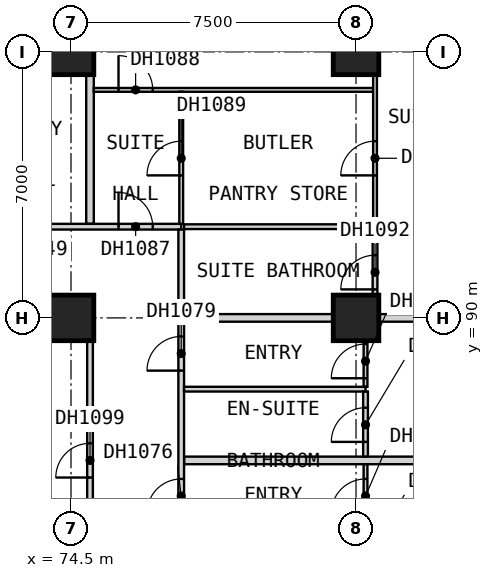
"""IFC4 building model, lengths in metres.
Left out: names, types, materials, properties, quantities, classifications, styles, units other than length and angle.
Written with IfcOpenShell. Run it as: python <this file> out.ifc"""

import sys

from ifc_helpers import new_model, si_unit, direction, frame, frame_2d, origin, origin_2d, place, context, subcontext, project, spatial, rectangle, extrude, element, fill, save


model = new_model("IFC4")
c1 = context("Model", 3, precision=1e-05, world=origin(), true_north=direction((0.0, 1.0)))
c2 = subcontext(c1, "Body", "Model", "MODEL_VIEW")
j1 = project(units=[si_unit("LENGTHUNIT", "METRE"), si_unit("PLANEANGLEUNIT", "RADIAN")], contexts=[c1])
p1 = place(None, origin())
s1 = spatial("IfcSite", under=j1, at=p1, CompositionType="ELEMENT")
p2 = place(p1, origin())
s2 = spatial("IfcBuilding", under=s1, at=p2, CompositionType="ELEMENT")
p3 = place(p2, frame((0.0, 0.0, 48.4)))
s3 = spatial("IfcBuildingStorey", under=s2, at=p3, CompositionType="ELEMENT", Elevation=48.4)
for number, where, z_axis, x_axis in (
    (1, (74.5, 90.0, 0.0), (0.0, 0.0, 1.0), (1.0, 0.0, 0.0)),
    (2, (74.5, 97.0, 0.0), (0.0, 0.0, 1.0), (1.0, 0.0, 0.0)),
    (3, (82.0, 90.0, 0.0), (0.0, 0.0, 1.0), (1.0, 0.0, 0.0)),
    (4, (82.0, 97.0, 0.0), (0.0, 0.0, 1.0), (1.0, 0.0, 0.0)),
):
    element("IfcColumn", number, at=place(p3, frame(where, z_axis=z_axis, x_axis=x_axis)), inside=s3, PredefinedType="COLUMN", context=c2, shape_type="SweptSolid", body=[
        extrude(rectangle(XDim=1.2, YDim=1.2, at=origin_2d()), origin(), (0.0, 0.0, 1.0), 3.6),
    ])
p4 = place(p3, frame((77.475, 86.25, 0.0), z_axis=(0.0, 0.0, 1.0), x_axis=(1.0, 0.0, 0.0)))
e5 = element("IfcWall", 5, at=p4, inside=s3, PredefinedType="PARTITIONING", context=c2, shape_type="SweptSolid", body=[
    extrude(rectangle(XDim=11.715, YDim=0.2, at=frame_2d((5.857, 0.0))), origin(), (0.0, 0.0, 1.0), 3.35),
])
p5 = place(p3, frame((77.475, 90.0, 0.0), z_axis=(0.0, 0.0, 1.0), x_axis=(1.0, 0.0, 0.0)))
e6 = element("IfcWall", 6, at=p5, inside=s3, PredefinedType="PARTITIONING", context=c2, shape_type="SweptSolid", body=[
    extrude(rectangle(XDim=12.525, YDim=0.2, at=frame_2d((6.262, 0.0))), origin(), (0.0, 0.0, 1.0), 3.35),
])
p6 = place(p3, frame((75.0, 92.475, 0.0), z_axis=(0.0, 0.0, 1.0), x_axis=(0.0, 1.0, 0.0)))
e7 = element("IfcWall", 7, at=p6, inside=s3, PredefinedType="PARTITIONING", context=c2, shape_type="SweptSolid", body=[
    extrude(rectangle(XDim=11.715, YDim=0.2, at=frame_2d((5.857, 0.0))), origin(), (0.0, 0.0, 1.0), 3.35),
])
p7 = place(p3, frame((33.75, 90.0, 0.0), z_axis=(0.0, 0.0, 1.0), x_axis=(1.0, 0.0, 0.0)))
e8 = element("IfcWall", 8, at=p7, inside=s3, PredefinedType="PARTITIONING", context=c2, shape_type="SweptSolid", body=[
    extrude(rectangle(XDim=41.25, YDim=0.15, at=frame_2d((20.625, 0.0))), origin(), (0.0, 0.0, 1.0), 3.35),
])
p8 = place(p7, frame((1.425, 0.0, 0.0)))
e9 = element("IfcOpeningElement", 9, at=p8, cuts=e8, PredefinedType="OPENING", context=c2, shape_type="SweptSolid", body=[
    extrude(rectangle(XDim=0.9, YDim=2.1, at=frame_2d((0.45, 1.05))), frame((0.0, 0.085, 0.0), z_axis=(0.0, -1.0, 0.0), x_axis=(1.0, 0.0, 0.0)), (0.0, 0.0, 1.0), 0.17),
])
p9 = place(p7, frame((12.45, 0.0, 0.0)))
e10 = element("IfcOpeningElement", 10, at=p9, cuts=e8, PredefinedType="OPENING", context=c2, shape_type="SweptSolid", body=[
    extrude(rectangle(XDim=0.9, YDim=2.1, at=frame_2d((0.45, 1.05))), frame((0.0, 0.085, 0.0), z_axis=(0.0, -1.0, 0.0), x_axis=(1.0, 0.0, 0.0)), (0.0, 0.0, 1.0), 0.17),
])
p10 = place(p3, frame((33.75, 92.4, 0.0), z_axis=(0.0, 0.0, 1.0), x_axis=(1.0, 0.0, 0.0)))
e11 = element("IfcWall", 11, at=p10, inside=s3, PredefinedType="PARTITIONING", context=c2, shape_type="SweptSolid", body=[
    extrude(rectangle(XDim=43.65, YDim=0.15, at=frame_2d((21.825, 0.0))), origin(), (0.0, 0.0, 1.0), 3.35),
])
p11 = place(p10, frame((5.175, 0.0, 0.0)))
e12 = element("IfcOpeningElement", 12, at=p11, cuts=e11, PredefinedType="OPENING", context=c2, shape_type="SweptSolid", body=[
    extrude(rectangle(XDim=0.9, YDim=2.1, at=frame_2d((0.45, 1.05))), frame((0.0, 0.085, 0.0), z_axis=(0.0, -1.0, 0.0), x_axis=(1.0, 0.0, 0.0)), (0.0, 0.0, 1.0), 0.17),
])
p12 = place(p10, frame((9.863, 0.0, 0.0)))
e13 = element("IfcOpeningElement", 13, at=p12, cuts=e11, PredefinedType="OPENING", context=c2, shape_type="SweptSolid", body=[
    extrude(rectangle(XDim=0.9, YDim=2.1, at=frame_2d((0.45, 1.05))), frame((0.0, 0.085, 0.0), z_axis=(0.0, -1.0, 0.0), x_axis=(1.0, 0.0, 0.0)), (0.0, 0.0, 1.0), 0.17),
])
p13 = place(p10, frame((13.613, 0.0, 0.0)))
e14 = element("IfcOpeningElement", 14, at=p13, cuts=e11, PredefinedType="OPENING", context=c2, shape_type="SweptSolid", body=[
    extrude(rectangle(XDim=0.9, YDim=2.1, at=frame_2d((0.45, 1.05))), frame((0.0, 0.085, 0.0), z_axis=(0.0, -1.0, 0.0), x_axis=(1.0, 0.0, 0.0)), (0.0, 0.0, 1.0), 0.17),
])
p14 = place(p10, frame((17.363, 0.0, 0.0)))
e15 = element("IfcOpeningElement", 15, at=p14, cuts=e11, PredefinedType="OPENING", context=c2, shape_type="SweptSolid", body=[
    extrude(rectangle(XDim=0.9, YDim=2.1, at=frame_2d((0.45, 1.05))), frame((0.0, 0.085, 0.0), z_axis=(0.0, -1.0, 0.0), x_axis=(1.0, 0.0, 0.0)), (0.0, 0.0, 1.0), 0.17),
])
p15 = place(p10, frame((21.113, 0.0, 0.0)))
e16 = element("IfcOpeningElement", 16, at=p15, cuts=e11, PredefinedType="OPENING", context=c2, shape_type="SweptSolid", body=[
    extrude(rectangle(XDim=0.9, YDim=2.1, at=frame_2d((0.45, 1.05))), frame((0.0, 0.085, 0.0), z_axis=(0.0, -1.0, 0.0), x_axis=(1.0, 0.0, 0.0)), (0.0, 0.0, 1.0), 0.17),
])
p16 = place(p10, frame((28.05, 0.0, 0.0)))
e17 = element("IfcOpeningElement", 17, at=p16, cuts=e11, PredefinedType="OPENING", context=c2, shape_type="SweptSolid", body=[
    extrude(rectangle(XDim=0.9, YDim=2.1, at=frame_2d((0.45, 1.05))), frame((0.0, 0.085, 0.0), z_axis=(0.0, -1.0, 0.0), x_axis=(1.0, 0.0, 0.0)), (0.0, 0.0, 1.0), 0.17),
])
p17 = place(p10, frame((32.363, 0.0, 0.0)))
e18 = element("IfcOpeningElement", 18, at=p17, cuts=e11, PredefinedType="OPENING", context=c2, shape_type="SweptSolid", body=[
    extrude(rectangle(XDim=0.9, YDim=2.1, at=frame_2d((0.45, 1.05))), frame((0.0, 0.085, 0.0), z_axis=(0.0, -1.0, 0.0), x_axis=(1.0, 0.0, 0.0)), (0.0, 0.0, 1.0), 0.17),
])
p18 = place(p10, frame((39.3, 0.0, 0.0)))
e19 = element("IfcOpeningElement", 19, at=p18, cuts=e11, PredefinedType="OPENING", context=c2, shape_type="SweptSolid", body=[
    extrude(rectangle(XDim=0.9, YDim=2.1, at=frame_2d((0.45, 1.05))), frame((0.0, 0.085, 0.0), z_axis=(0.0, -1.0, 0.0), x_axis=(1.0, 0.0, 0.0)), (0.0, 0.0, 1.0), 0.17),
])
p19 = place(p10, frame((42.0, 0.0, 0.0)))
e20 = element("IfcOpeningElement", 20, at=p19, cuts=e11, PredefinedType="OPENING", context=c2, shape_type="SweptSolid", body=[
    extrude(rectangle(XDim=0.9, YDim=2.1, at=frame_2d((0.45, 1.05))), frame((0.0, 0.085, 0.0), z_axis=(0.0, -1.0, 0.0), x_axis=(1.0, 0.0, 0.0)), (0.0, 0.0, 1.0), 0.17),
])
p20 = place(p3, frame((75.0, 78.075, 0.0), z_axis=(0.0, 0.0, 1.0), x_axis=(0.0, 1.0, 0.0)))
e21 = element("IfcWall", 21, at=p20, inside=s3, PredefinedType="PARTITIONING", context=c2, shape_type="SweptSolid", body=[
    extrude(rectangle(XDim=11.85, YDim=0.15, at=frame_2d((5.925, 0.0))), origin(), (0.0, 0.0, 1.0), 3.35),
])
p21 = place(p20, frame((7.725, 0.0, 0.0)))
e22 = element("IfcOpeningElement", 22, at=p21, cuts=e21, PredefinedType="OPENING", context=c2, shape_type="SweptSolid", body=[
    extrude(rectangle(XDim=0.9, YDim=2.1, at=frame_2d((0.45, 1.05))), frame((0.0, 0.085, 0.0), z_axis=(0.0, -1.0, 0.0), x_axis=(1.0, 0.0, 0.0)), (0.0, 0.0, 1.0), 0.17),
])
p22 = place(p20, frame((1.725, 0.0, 0.0)))
e23 = element("IfcOpeningElement", 23, at=p22, cuts=e21, PredefinedType="OPENING", context=c2, shape_type="SweptSolid", body=[
    extrude(rectangle(XDim=0.9, YDim=2.1, at=frame_2d((0.45, 1.05))), frame((0.0, 0.085, 0.0), z_axis=(0.0, -1.0, 0.0), x_axis=(1.0, 0.0, 0.0)), (0.0, 0.0, 1.0), 0.17),
])
p23 = place(p3, frame((77.4, 50.175, 0.0), z_axis=(0.0, 0.0, 1.0), x_axis=(0.0, 1.0, 0.0)))
e24 = element("IfcWall", 24, at=p23, inside=s3, PredefinedType="PARTITIONING", context=c2, shape_type="SweptSolid", body=[
    extrude(rectangle(XDim=42.15, YDim=0.15, at=frame_2d((21.075, 0.0))), origin(), (0.0, 0.0, 1.0), 3.35),
])
p24 = place(p23, frame((4.688, 0.0, 0.0)))
e25 = element("IfcOpeningElement", 25, at=p24, cuts=e24, PredefinedType="OPENING", context=c2, shape_type="SweptSolid", body=[
    extrude(rectangle(XDim=0.9, YDim=2.1, at=frame_2d((0.45, 1.05))), frame((0.0, 0.085, 0.0), z_axis=(0.0, -1.0, 0.0), x_axis=(1.0, 0.0, 0.0)), (0.0, 0.0, 1.0), 0.17),
])
p25 = place(p23, frame((8.438, 0.0, 0.0)))
e26 = element("IfcOpeningElement", 26, at=p25, cuts=e24, PredefinedType="OPENING", context=c2, shape_type="SweptSolid", body=[
    extrude(rectangle(XDim=0.9, YDim=2.1, at=frame_2d((0.45, 1.05))), frame((0.0, 0.085, 0.0), z_axis=(0.0, -1.0, 0.0), x_axis=(1.0, 0.0, 0.0)), (0.0, 0.0, 1.0), 0.17),
])
p26 = place(p23, frame((12.188, 0.0, 0.0)))
e27 = element("IfcOpeningElement", 27, at=p26, cuts=e24, PredefinedType="OPENING", context=c2, shape_type="SweptSolid", body=[
    extrude(rectangle(XDim=0.9, YDim=2.1, at=frame_2d((0.45, 1.05))), frame((0.0, 0.085, 0.0), z_axis=(0.0, -1.0, 0.0), x_axis=(1.0, 0.0, 0.0)), (0.0, 0.0, 1.0), 0.17),
])
p27 = place(p23, frame((15.938, 0.0, 0.0)))
e28 = element("IfcOpeningElement", 28, at=p27, cuts=e24, PredefinedType="OPENING", context=c2, shape_type="SweptSolid", body=[
    extrude(rectangle(XDim=0.9, YDim=2.1, at=frame_2d((0.45, 1.05))), frame((0.0, 0.085, 0.0), z_axis=(0.0, -1.0, 0.0), x_axis=(1.0, 0.0, 0.0)), (0.0, 0.0, 1.0), 0.17),
])
p28 = place(p23, frame((19.688, 0.0, 0.0)))
e29 = element("IfcOpeningElement", 29, at=p28, cuts=e24, PredefinedType="OPENING", context=c2, shape_type="SweptSolid", body=[
    extrude(rectangle(XDim=0.9, YDim=2.1, at=frame_2d((0.45, 1.05))), frame((0.0, 0.085, 0.0), z_axis=(0.0, -1.0, 0.0), x_axis=(1.0, 0.0, 0.0)), (0.0, 0.0, 1.0), 0.17),
])
p29 = place(p23, frame((23.438, 0.0, 0.0)))
e30 = element("IfcOpeningElement", 30, at=p29, cuts=e24, PredefinedType="OPENING", context=c2, shape_type="SweptSolid", body=[
    extrude(rectangle(XDim=0.9, YDim=2.1, at=frame_2d((0.45, 1.05))), frame((0.0, 0.085, 0.0), z_axis=(0.0, -1.0, 0.0), x_axis=(1.0, 0.0, 0.0)), (0.0, 0.0, 1.0), 0.17),
])
p30 = place(p23, frame((27.188, 0.0, 0.0)))
e31 = element("IfcOpeningElement", 31, at=p30, cuts=e24, PredefinedType="OPENING", context=c2, shape_type="SweptSolid", body=[
    extrude(rectangle(XDim=0.9, YDim=2.1, at=frame_2d((0.45, 1.05))), frame((0.0, 0.085, 0.0), z_axis=(0.0, -1.0, 0.0), x_axis=(1.0, 0.0, 0.0)), (0.0, 0.0, 1.0), 0.17),
])
p31 = place(p23, frame((30.938, 0.0, 0.0)))
e32 = element("IfcOpeningElement", 32, at=p31, cuts=e24, PredefinedType="OPENING", context=c2, shape_type="SweptSolid", body=[
    extrude(rectangle(XDim=0.9, YDim=2.1, at=frame_2d((0.45, 1.05))), frame((0.0, 0.085, 0.0), z_axis=(0.0, -1.0, 0.0), x_axis=(1.0, 0.0, 0.0)), (0.0, 0.0, 1.0), 0.17),
])
p32 = place(p23, frame((34.688, 0.0, 0.0)))
e33 = element("IfcOpeningElement", 33, at=p32, cuts=e24, PredefinedType="OPENING", context=c2, shape_type="SweptSolid", body=[
    extrude(rectangle(XDim=0.9, YDim=2.1, at=frame_2d((0.45, 1.05))), frame((0.0, 0.085, 0.0), z_axis=(0.0, -1.0, 0.0), x_axis=(1.0, 0.0, 0.0)), (0.0, 0.0, 1.0), 0.17),
])
p33 = place(p23, frame((38.438, 0.0, 0.0)))
e34 = element("IfcOpeningElement", 34, at=p33, cuts=e24, PredefinedType="OPENING", context=c2, shape_type="SweptSolid", body=[
    extrude(rectangle(XDim=0.9, YDim=2.1, at=frame_2d((0.45, 1.05))), frame((0.0, 0.085, 0.0), z_axis=(0.0, -1.0, 0.0), x_axis=(1.0, 0.0, 0.0)), (0.0, 0.0, 1.0), 0.17),
])
p34 = place(p3, frame((75.1, 96.0, 0.0), z_axis=(0.0, 0.0, 1.0), x_axis=(1.0, 0.0, 0.0)))
e35 = element("IfcWall", 35, at=p34, inside=s3, PredefinedType="PARTITIONING", context=c2, shape_type="SweptSolid", body=[
    extrude(rectangle(XDim=7.35, YDim=0.1, at=frame_2d((3.675, 0.0))), origin(), (0.0, 0.0, 1.0), 3.35),
])
p35 = place(p34, frame((0.65, 0.0, 0.0)))
e36 = element("IfcOpeningElement", 36, at=p35, cuts=e35, PredefinedType="OPENING", context=c2, shape_type="SweptSolid", body=[
    extrude(rectangle(XDim=0.9, YDim=2.1, at=frame_2d((0.45, 1.05))), frame((0.0, 0.06, 0.0), z_axis=(0.0, -1.0, 0.0), x_axis=(1.0, 0.0, 0.0)), (0.0, 0.0, 1.0), 0.12),
])
p36 = place(p3, frame((72.062, 96.75, 0.0), z_axis=(0.0, 0.0, 1.0), x_axis=(1.0, 0.0, 0.0)))
e37 = element("IfcWall", 37, at=p36, inside=s3, PredefinedType="PARTITIONING", context=c2, shape_type="SweptSolid", body=[
    extrude(rectangle(XDim=2.837, YDim=0.1, at=frame_2d((1.419, 0.0))), origin(), (0.0, 0.0, 1.0), 3.35),
])
p37 = place(p36, frame((0.887, 0.0, 0.0)))
e38 = element("IfcOpeningElement", 38, at=p37, cuts=e37, PredefinedType="OPENING", context=c2, shape_type="SweptSolid", body=[
    extrude(rectangle(XDim=0.9, YDim=2.1, at=frame_2d((0.45, 1.05))), frame((0.0, 0.06, 0.0), z_axis=(0.0, -1.0, 0.0), x_axis=(1.0, 0.0, 0.0)), (0.0, 0.0, 1.0), 0.12),
])
p38 = place(p3, frame((77.4, 92.475, 0.0), z_axis=(0.0, 0.0, 1.0), x_axis=(0.0, 1.0, 0.0)))
e39 = element("IfcWall", 39, at=p38, inside=s3, PredefinedType="PARTITIONING", context=c2, shape_type="SweptSolid", body=[
    extrude(rectangle(XDim=3.475, YDim=0.1, at=frame_2d((1.737, 0.0))), origin(), (0.0, 0.0, 1.0), 3.35),
])
p39 = place(p38, frame((1.275, 0.0, 0.0)))
e40 = element("IfcOpeningElement", 40, at=p39, cuts=e39, PredefinedType="OPENING", context=c2, shape_type="SweptSolid", body=[
    extrude(rectangle(XDim=0.9, YDim=2.1, at=frame_2d((0.45, 1.05))), frame((0.0, 0.06, 0.0), z_axis=(0.0, -1.0, 0.0), x_axis=(1.0, 0.0, 0.0)), (0.0, 0.0, 1.0), 0.12),
])
p40 = place(p3, frame((82.25, 84.438, 0.0), z_axis=(0.0, 0.0, 1.0), x_axis=(0.0, 1.0, 0.0)))
e41 = element("IfcWall", 41, at=p40, inside=s3, PredefinedType="PARTITIONING", context=c2, shape_type="SweptSolid", body=[
    extrude(rectangle(XDim=1.712, YDim=0.1, at=frame_2d((0.856, 0.0))), origin(), (0.0, 0.0, 1.0), 3.35),
])
p41 = place(p40, frame((0.425, 0.0, 0.0)))
e42 = element("IfcOpeningElement", 42, at=p41, cuts=e41, PredefinedType="OPENING", context=c2, shape_type="SweptSolid", body=[
    extrude(rectangle(XDim=0.9, YDim=2.1, at=frame_2d((0.45, 1.05))), frame((0.0, 0.06, 0.0), z_axis=(0.0, -1.0, 0.0), x_axis=(1.0, 0.0, 0.0)), (0.0, 0.0, 1.0), 0.12),
])
p42 = place(p3, frame((82.25, 88.188, 0.0), z_axis=(0.0, 0.0, 1.0), x_axis=(0.0, 1.0, 0.0)))
e43 = element("IfcWall", 43, at=p42, inside=s3, PredefinedType="PARTITIONING", context=c2, shape_type="SweptSolid", body=[
    extrude(rectangle(XDim=1.712, YDim=0.1, at=frame_2d((0.856, 0.0))), origin(), (0.0, 0.0, 1.0), 3.35),
])
p43 = place(p42, frame((0.225, 0.0, 0.0)))
e44 = element("IfcOpeningElement", 44, at=p43, cuts=e43, PredefinedType="OPENING", context=c2, shape_type="SweptSolid", body=[
    extrude(rectangle(XDim=0.9, YDim=2.1, at=frame_2d((0.45, 1.05))), frame((0.0, 0.06, 0.0), z_axis=(0.0, -1.0, 0.0), x_axis=(1.0, 0.0, 0.0)), (0.0, 0.0, 1.0), 0.12),
])
p44 = place(p3, frame((82.5, 92.462, 0.0), z_axis=(0.0, 0.0, 1.0), x_axis=(0.0, 1.0, 0.0)))
e45 = element("IfcWall", 45, at=p44, inside=s3, PredefinedType="PARTITIONING", context=c2, shape_type="SweptSolid", body=[
    extrude(rectangle(XDim=11.728, YDim=0.1, at=frame_2d((5.864, 0.0))), origin(), (0.0, 0.0, 1.0), 3.35),
])
p45 = place(p44, frame((9.837, 0.0, 0.0)))
e46 = element("IfcOpeningElement", 46, at=p45, cuts=e45, PredefinedType="OPENING", context=c2, shape_type="SweptSolid", body=[
    extrude(rectangle(XDim=0.9, YDim=2.1, at=frame_2d((0.45, 1.05))), frame((0.0, 0.06, 0.0), z_axis=(0.0, -1.0, 0.0), x_axis=(1.0, 0.0, 0.0)), (0.0, 0.0, 1.0), 0.12),
])
p46 = place(p44, frame((1.288, 0.0, 0.0)))
e47 = element("IfcOpeningElement", 47, at=p46, cuts=e45, PredefinedType="OPENING", context=c2, shape_type="SweptSolid", body=[
    extrude(rectangle(XDim=0.9, YDim=2.1, at=frame_2d((0.45, 1.05))), frame((0.0, 0.06, 0.0), z_axis=(0.0, -1.0, 0.0), x_axis=(1.0, 0.0, 0.0)), (0.0, 0.0, 1.0), 0.12),
])
p47 = place(p3, frame((77.475, 88.125, 0.0), z_axis=(0.0, 0.0, 1.0), x_axis=(1.0, 0.0, 0.0)))
e48 = element("IfcWall", 48, at=p47, inside=s3, PredefinedType="PARTITIONING", context=c2, shape_type="SweptSolid", body=[
    extrude(rectangle(XDim=4.775, YDim=0.125, at=frame_2d((2.387, 0.0))), origin(), (0.0, 0.0, 1.0), 3.35),
])
p48 = place(p3, frame((77.475, 92.4, 0.0), z_axis=(0.0, 0.0, 1.0), x_axis=(1.0, 0.0, 0.0)))
e49 = element("IfcWall", 49, at=p48, inside=s3, PredefinedType="PARTITIONING", context=c2, shape_type="SweptSolid", body=[
    extrude(rectangle(XDim=5.025, YDim=0.125, at=frame_2d((2.512, 0.0))), origin(), (0.0, 0.0, 1.0), 3.35),
])
p49 = place(p3, frame((82.25, 86.35, 0.0), z_axis=(0.0, 0.0, 1.0), x_axis=(0.0, 1.0, 0.0)))
e50 = element("IfcWall", 50, at=p49, inside=s3, PredefinedType="PARTITIONING", context=c2, shape_type="SweptSolid", body=[
    extrude(rectangle(XDim=1.712, YDim=0.125, at=frame_2d((0.856, 0.0))), origin(), (0.0, 0.0, 1.0), 3.35),
])
p50 = place(p49, frame((0.387, 0.0, 0.0)))
e51 = element("IfcOpeningElement", 51, at=p50, cuts=e50, PredefinedType="OPENING", context=c2, shape_type="SweptSolid", body=[
    extrude(rectangle(XDim=0.9, YDim=2.1, at=frame_2d((0.45, 1.05))), frame((0.0, 0.073, 0.0), z_axis=(0.0, -1.0, 0.0), x_axis=(1.0, 0.0, 0.0)), (0.0, 0.0, 1.0), 0.145),
])
p51 = place(p3, frame((82.5, 90.1, 0.0), z_axis=(0.0, 0.0, 1.0), x_axis=(0.0, 1.0, 0.0)))
e52 = element("IfcWall", 52, at=p51, inside=s3, PredefinedType="PARTITIONING", context=c2, shape_type="SweptSolid", body=[
    extrude(rectangle(XDim=2.237, YDim=0.125, at=frame_2d((1.119, 0.0))), origin(), (0.0, 0.0, 1.0), 3.35),
])
p52 = place(p51, frame((0.65, 0.0, 0.0)))
e53 = element("IfcOpeningElement", 53, at=p52, cuts=e52, PredefinedType="OPENING", context=c2, shape_type="SweptSolid", body=[
    extrude(rectangle(XDim=0.9, YDim=2.1, at=frame_2d((0.45, 1.05))), frame((0.0, 0.073, 0.0), z_axis=(0.0, -1.0, 0.0), x_axis=(1.0, 0.0, 0.0)), (0.0, 0.0, 1.0), 0.145),
])
p53 = place(p32, origin())
e54 = element("IfcDoor", 54, at=p53, inside=s3, OperationType="SINGLE_SWING_RIGHT", PredefinedType="DOOR", context=c2, shape_type="SweptSolid", body=[
    extrude(rectangle(XDim=0.9, YDim=2.1, at=frame_2d((0.45, 1.05))), frame((0.0, 0.025, 0.0), z_axis=(0.0, -1.0, 0.0), x_axis=(1.0, 0.0, 0.0)), (0.0, 0.0, 1.0), 0.05),
])
fill(e33, e54)
p54 = place(p41, origin())
e55 = element("IfcDoor", 55, at=p54, inside=s3, OperationType="SINGLE_SWING_LEFT", PredefinedType="DOOR", context=c2, shape_type="SweptSolid", body=[
    extrude(rectangle(XDim=0.9, YDim=2.1, at=frame_2d((0.45, 1.05))), frame((0.0, 0.025, 0.0), z_axis=(0.0, -1.0, 0.0), x_axis=(1.0, 0.0, 0.0)), (0.0, 0.0, 1.0), 0.05),
])
fill(e42, e55)
p55 = place(p50, origin())
e56 = element("IfcDoor", 56, at=p55, inside=s3, OperationType="SINGLE_SWING_LEFT", PredefinedType="DOOR", context=c2, shape_type="SweptSolid", body=[
    extrude(rectangle(XDim=0.9, YDim=2.1, at=frame_2d((0.45, 1.05))), frame((0.0, 0.025, 0.0), z_axis=(0.0, -1.0, 0.0), x_axis=(1.0, 0.0, 0.0)), (0.0, 0.0, 1.0), 0.05),
])
fill(e51, e56)
p56 = place(p33, origin())
e57 = element("IfcDoor", 57, at=p56, inside=s3, OperationType="SINGLE_SWING_RIGHT", PredefinedType="DOOR", context=c2, shape_type="SweptSolid", body=[
    extrude(rectangle(XDim=0.9, YDim=2.1, at=frame_2d((0.45, 1.05))), frame((0.0, 0.025, 0.0), z_axis=(0.0, -1.0, 0.0), x_axis=(1.0, 0.0, 0.0)), (0.0, 0.0, 1.0), 0.05),
])
fill(e34, e57)
p57 = place(p43, origin())
e58 = element("IfcDoor", 58, at=p57, inside=s3, OperationType="SINGLE_SWING_LEFT", PredefinedType="DOOR", context=c2, shape_type="SweptSolid", body=[
    extrude(rectangle(XDim=0.9, YDim=2.1, at=frame_2d((0.45, 1.05))), frame((0.0, 0.025, 0.0), z_axis=(0.0, -1.0, 0.0), x_axis=(1.0, 0.0, 0.0)), (0.0, 0.0, 1.0), 0.05),
])
fill(e44, e58)
p58 = place(p19, origin())
e59 = element("IfcDoor", 59, at=p58, inside=s3, OperationType="SINGLE_SWING_RIGHT", PredefinedType="DOOR", context=c2, shape_type="SweptSolid", body=[
    extrude(rectangle(XDim=0.9, YDim=2.1, at=frame_2d((0.45, 1.05))), frame((0.0, 0.025, 0.0), z_axis=(0.0, -1.0, 0.0), x_axis=(1.0, 0.0, 0.0)), (0.0, 0.0, 1.0), 0.05),
])
fill(e20, e59)
p59 = place(p35, origin())
e60 = element("IfcDoor", 60, at=p59, inside=s3, OperationType="SINGLE_SWING_LEFT", PredefinedType="DOOR", context=c2, shape_type="SweptSolid", body=[
    extrude(rectangle(XDim=0.9, YDim=2.1, at=frame_2d((0.45, 1.05))), frame((0.0, 0.025, 0.0), z_axis=(0.0, -1.0, 0.0), x_axis=(1.0, 0.0, 0.0)), (0.0, 0.0, 1.0), 0.05),
])
fill(e36, e60)
p60 = place(p39, origin())
e61 = element("IfcDoor", 61, at=p60, inside=s3, OperationType="SINGLE_SWING_RIGHT", PredefinedType="DOOR", context=c2, shape_type="SweptSolid", body=[
    extrude(rectangle(XDim=0.9, YDim=2.1, at=frame_2d((0.45, 1.05))), frame((0.0, 0.025, 0.0), z_axis=(0.0, -1.0, 0.0), x_axis=(1.0, 0.0, 0.0)), (0.0, 0.0, 1.0), 0.05),
])
fill(e40, e61)
p61 = place(p46, origin())
e62 = element("IfcDoor", 62, at=p61, inside=s3, OperationType="SINGLE_SWING_RIGHT", PredefinedType="DOOR", context=c2, shape_type="SweptSolid", body=[
    extrude(rectangle(XDim=0.9, YDim=2.1, at=frame_2d((0.45, 1.05))), frame((0.0, 0.025, 0.0), z_axis=(0.0, -1.0, 0.0), x_axis=(1.0, 0.0, 0.0)), (0.0, 0.0, 1.0), 0.05),
])
fill(e47, e62)
p62 = place(p52, origin())
e63 = element("IfcDoor", 63, at=p62, inside=s3, OperationType="SINGLE_SWING_LEFT", PredefinedType="DOOR", context=c2, shape_type="SweptSolid", body=[
    extrude(rectangle(XDim=0.9, YDim=2.1, at=frame_2d((0.45, 1.05))), frame((0.0, 0.025, 0.0), z_axis=(0.0, -1.0, 0.0), x_axis=(1.0, 0.0, 0.0)), (0.0, 0.0, 1.0), 0.05),
])
fill(e53, e63)
p63 = place(p21, origin())
e64 = element("IfcDoor", 64, at=p63, inside=s3, OperationType="SINGLE_SWING_LEFT", PredefinedType="DOOR", context=c2, shape_type="SweptSolid", body=[
    extrude(rectangle(XDim=0.9, YDim=2.1, at=frame_2d((0.45, 1.05))), frame((0.0, 0.025, 0.0), z_axis=(0.0, -1.0, 0.0), x_axis=(1.0, 0.0, 0.0)), (0.0, 0.0, 1.0), 0.05),
])
fill(e22, e64)
save(model, sys.argv[1])
